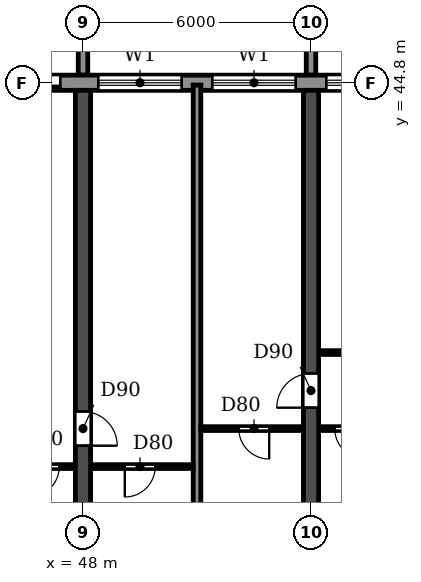
"""IFC4 building model, lengths in metres.
Left out: names, types, materials, properties, quantities, classifications, styles, units other than length and angle.
Written with IfcOpenShell. Run it as: python <this file> out.ifc"""

import sys

from ifc_helpers import new_model, si_unit, direction, frame, frame_2d, origin, place, context, subcontext, project, spatial, polyline, rectangle, outline, extrude, source, transform, mapped, element, fill, save


model = new_model("IFC4")
c1 = context("Model", 3, precision=1e-05, world=origin(), true_north=direction((0.0, 1.0)))
c2 = subcontext(c1, "Body", "Model", "MODEL_VIEW")
j1 = project(units=[si_unit("LENGTHUNIT", "METRE"), si_unit("PLANEANGLEUNIT", "RADIAN")], contexts=[c1])
p1 = place(None, origin())
s1 = spatial("IfcSite", under=j1, at=p1, CompositionType="ELEMENT")
p2 = place(p1, origin())
s2 = spatial("IfcBuilding", under=s1, at=p2, CompositionType="ELEMENT")
p3 = place(p2, frame((0.0, 0.0, 43.2)))
s3 = spatial("IfcBuildingStorey", under=s2, at=p3, CompositionType="ELEMENT", Elevation=43.2)
p4 = place(p3, frame((48.0, 30.55, 0.0), z_axis=(0.0, 0.0, 1.0), x_axis=(0.0, 1.0, 0.0)))
e1 = element("IfcWall", 1, at=p4, inside=s3, PredefinedType="SHEAR", context=c2, shape_type="SweptSolid", body=[
    extrude(rectangle(XDim=14.05, YDim=0.4, at=frame_2d((7.025, 0.0))), origin(), (0.0, 0.0, 1.0), 3.05),
])
p5 = place(p4, frame((4.7, 0.0, 0.0)))
e2 = element("IfcOpeningElement", 2, at=p5, cuts=e1, PredefinedType="OPENING", context=c2, shape_type="SweptSolid", body=[
    extrude(rectangle(XDim=0.9, YDim=2.1, at=frame_2d((0.45, 1.05))), frame((0.0, 0.21, 0.0), z_axis=(0.0, -1.0, 0.0), x_axis=(1.0, 0.0, 0.0)), (0.0, 0.0, 1.0), 0.42),
])
p6 = place(p3, frame((54.0, 30.55, 0.0), z_axis=(0.0, 0.0, 1.0), x_axis=(0.0, 1.0, 0.0)))
e3 = element("IfcWall", 3, at=p6, inside=s3, PredefinedType="SHEAR", context=c2, shape_type="SweptSolid", body=[
    extrude(rectangle(XDim=14.05, YDim=0.4, at=frame_2d((7.025, 0.0))), origin(), (0.0, 0.0, 1.0), 3.05),
])
p7 = place(p6, frame((5.7, 0.0, 0.0)))
e4 = element("IfcOpeningElement", 4, at=p7, cuts=e3, PredefinedType="OPENING", context=c2, shape_type="SweptSolid", body=[
    extrude(rectangle(XDim=0.9, YDim=2.1, at=frame_2d((0.45, 1.05))), frame((0.0, 0.21, 0.0), z_axis=(0.0, -1.0, 0.0), x_axis=(1.0, 0.0, 0.0)), (0.0, 0.0, 1.0), 0.42),
])
p8 = place(p3, frame((97.317, 44.8, 0.0), z_axis=(0.0, 0.0, 1.0), x_axis=(-1.0, 0.0, 0.0)))
e5 = element("IfcWall", 5, at=p8, inside=s3, PredefinedType="STANDARD", context=c2, shape_type="SweptSolid", body=[
    extrude(rectangle(XDim=92.634, YDim=0.4, at=frame_2d((46.317, 0.0))), origin(), (0.0, 0.0, 1.0), 3.05),
])
p9 = place(p8, frame((88.917, 0.0, 0.0)))
e6 = element("IfcOpeningElement", 6, at=p9, cuts=e5, PredefinedType="OPENING", context=c2, shape_type="SweptSolid", body=[
    extrude(rectangle(XDim=1.8, YDim=2.4, at=frame_2d((0.9, 1.2))), frame((0.0, 0.21, 0.0), z_axis=(0.0, -1.0, 0.0), x_axis=(1.0, 0.0, 0.0)), (0.0, 0.0, 1.0), 0.42),
])
p10 = place(p8, frame((85.717, 0.0, 0.9)))
e7 = element("IfcOpeningElement", 7, at=p10, cuts=e5, PredefinedType="OPENING", context=c2, shape_type="SweptSolid", body=[
    extrude(rectangle(XDim=2.2, YDim=1.5, at=frame_2d((1.1, 0.75))), frame((0.0, 0.21, 0.0), z_axis=(0.0, -1.0, 0.0), x_axis=(1.0, 0.0, 0.0)), (0.0, 0.0, 1.0), 0.42),
])
p11 = place(p8, frame((82.717, 0.0, 0.9)))
e8 = element("IfcOpeningElement", 8, at=p11, cuts=e5, PredefinedType="OPENING", context=c2, shape_type="SweptSolid", body=[
    extrude(rectangle(XDim=2.2, YDim=1.5, at=frame_2d((1.1, 0.75))), frame((0.0, 0.21, 0.0), z_axis=(0.0, -1.0, 0.0), x_axis=(1.0, 0.0, 0.0)), (0.0, 0.0, 1.0), 0.42),
])
p12 = place(p8, frame((79.717, 0.0, 0.9)))
e9 = element("IfcOpeningElement", 9, at=p12, cuts=e5, PredefinedType="OPENING", context=c2, shape_type="SweptSolid", body=[
    extrude(rectangle(XDim=2.2, YDim=1.5, at=frame_2d((1.1, 0.75))), frame((0.0, 0.21, 0.0), z_axis=(0.0, -1.0, 0.0), x_axis=(1.0, 0.0, 0.0)), (0.0, 0.0, 1.0), 0.42),
])
p13 = place(p8, frame((76.717, 0.0, 0.9)))
e10 = element("IfcOpeningElement", 10, at=p13, cuts=e5, PredefinedType="OPENING", context=c2, shape_type="SweptSolid", body=[
    extrude(rectangle(XDim=2.2, YDim=1.5, at=frame_2d((1.1, 0.75))), frame((0.0, 0.21, 0.0), z_axis=(0.0, -1.0, 0.0), x_axis=(1.0, 0.0, 0.0)), (0.0, 0.0, 1.0), 0.42),
])
p14 = place(p8, frame((73.917, 0.0, 0.0)))
e11 = element("IfcOpeningElement", 11, at=p14, cuts=e5, PredefinedType="OPENING", context=c2, shape_type="SweptSolid", body=[
    extrude(rectangle(XDim=1.8, YDim=2.4, at=frame_2d((0.9, 1.2))), frame((0.0, 0.21, 0.0), z_axis=(0.0, -1.0, 0.0), x_axis=(1.0, 0.0, 0.0)), (0.0, 0.0, 1.0), 0.42),
])
p15 = place(p8, frame((70.717, 0.0, 0.9)))
e12 = element("IfcOpeningElement", 12, at=p15, cuts=e5, PredefinedType="OPENING", context=c2, shape_type="SweptSolid", body=[
    extrude(rectangle(XDim=2.2, YDim=1.5, at=frame_2d((1.1, 0.75))), frame((0.0, 0.21, 0.0), z_axis=(0.0, -1.0, 0.0), x_axis=(1.0, 0.0, 0.0)), (0.0, 0.0, 1.0), 0.42),
])
p16 = place(p8, frame((67.717, 0.0, 0.9)))
e13 = element("IfcOpeningElement", 13, at=p16, cuts=e5, PredefinedType="OPENING", context=c2, shape_type="SweptSolid", body=[
    extrude(rectangle(XDim=2.2, YDim=1.5, at=frame_2d((1.1, 0.75))), frame((0.0, 0.21, 0.0), z_axis=(0.0, -1.0, 0.0), x_axis=(1.0, 0.0, 0.0)), (0.0, 0.0, 1.0), 0.42),
])
p17 = place(p8, frame((64.717, 0.0, 0.9)))
e14 = element("IfcOpeningElement", 14, at=p17, cuts=e5, PredefinedType="OPENING", context=c2, shape_type="SweptSolid", body=[
    extrude(rectangle(XDim=2.2, YDim=1.5, at=frame_2d((1.1, 0.75))), frame((0.0, 0.21, 0.0), z_axis=(0.0, -1.0, 0.0), x_axis=(1.0, 0.0, 0.0)), (0.0, 0.0, 1.0), 0.42),
])
p18 = place(p8, frame((61.917, 0.0, 0.0)))
e15 = element("IfcOpeningElement", 15, at=p18, cuts=e5, PredefinedType="OPENING", context=c2, shape_type="SweptSolid", body=[
    extrude(rectangle(XDim=1.8, YDim=2.4, at=frame_2d((0.9, 1.2))), frame((0.0, 0.21, 0.0), z_axis=(0.0, -1.0, 0.0), x_axis=(1.0, 0.0, 0.0)), (0.0, 0.0, 1.0), 0.42),
])
p19 = place(p8, frame((58.717, 0.0, 0.9)))
e16 = element("IfcOpeningElement", 16, at=p19, cuts=e5, PredefinedType="OPENING", context=c2, shape_type="SweptSolid", body=[
    extrude(rectangle(XDim=2.2, YDim=1.5, at=frame_2d((1.1, 0.75))), frame((0.0, 0.21, 0.0), z_axis=(0.0, -1.0, 0.0), x_axis=(1.0, 0.0, 0.0)), (0.0, 0.0, 1.0), 0.42),
])
p20 = place(p8, frame((55.717, 0.0, 0.9)))
e17 = element("IfcOpeningElement", 17, at=p20, cuts=e5, PredefinedType="OPENING", context=c2, shape_type="SweptSolid", body=[
    extrude(rectangle(XDim=2.2, YDim=1.5, at=frame_2d((1.1, 0.75))), frame((0.0, 0.21, 0.0), z_axis=(0.0, -1.0, 0.0), x_axis=(1.0, 0.0, 0.0)), (0.0, 0.0, 1.0), 0.42),
])
p21 = place(p8, frame((52.717, 0.0, 0.9)))
e18 = element("IfcOpeningElement", 18, at=p21, cuts=e5, PredefinedType="OPENING", context=c2, shape_type="SweptSolid", body=[
    extrude(rectangle(XDim=2.2, YDim=1.5, at=frame_2d((1.1, 0.75))), frame((0.0, 0.21, 0.0), z_axis=(0.0, -1.0, 0.0), x_axis=(1.0, 0.0, 0.0)), (0.0, 0.0, 1.0), 0.42),
])
p22 = place(p8, frame((49.917, 0.0, 0.0)))
e19 = element("IfcOpeningElement", 19, at=p22, cuts=e5, PredefinedType="OPENING", context=c2, shape_type="SweptSolid", body=[
    extrude(rectangle(XDim=1.8, YDim=2.4, at=frame_2d((0.9, 1.2))), frame((0.0, 0.21, 0.0), z_axis=(0.0, -1.0, 0.0), x_axis=(1.0, 0.0, 0.0)), (0.0, 0.0, 1.0), 0.42),
])
p23 = place(p8, frame((46.717, 0.0, 0.9)))
e20 = element("IfcOpeningElement", 20, at=p23, cuts=e5, PredefinedType="OPENING", context=c2, shape_type="SweptSolid", body=[
    extrude(rectangle(XDim=2.2, YDim=1.5, at=frame_2d((1.1, 0.75))), frame((0.0, 0.21, 0.0), z_axis=(0.0, -1.0, 0.0), x_axis=(1.0, 0.0, 0.0)), (0.0, 0.0, 1.0), 0.42),
])
p24 = place(p8, frame((43.717, 0.0, 0.9)))
e21 = element("IfcOpeningElement", 21, at=p24, cuts=e5, PredefinedType="OPENING", context=c2, shape_type="SweptSolid", body=[
    extrude(rectangle(XDim=2.2, YDim=1.5, at=frame_2d((1.1, 0.75))), frame((0.0, 0.21, 0.0), z_axis=(0.0, -1.0, 0.0), x_axis=(1.0, 0.0, 0.0)), (0.0, 0.0, 1.0), 0.42),
])
p25 = place(p8, frame((40.717, 0.0, 0.9)))
e22 = element("IfcOpeningElement", 22, at=p25, cuts=e5, PredefinedType="OPENING", context=c2, shape_type="SweptSolid", body=[
    extrude(rectangle(XDim=2.2, YDim=1.5, at=frame_2d((1.1, 0.75))), frame((0.0, 0.21, 0.0), z_axis=(0.0, -1.0, 0.0), x_axis=(1.0, 0.0, 0.0)), (0.0, 0.0, 1.0), 0.42),
])
p26 = place(p8, frame((37.917, 0.0, 0.0)))
e23 = element("IfcOpeningElement", 23, at=p26, cuts=e5, PredefinedType="OPENING", context=c2, shape_type="SweptSolid", body=[
    extrude(rectangle(XDim=1.8, YDim=2.4, at=frame_2d((0.9, 1.2))), frame((0.0, 0.21, 0.0), z_axis=(0.0, -1.0, 0.0), x_axis=(1.0, 0.0, 0.0)), (0.0, 0.0, 1.0), 0.42),
])
p27 = place(p8, frame((34.717, 0.0, 0.9)))
e24 = element("IfcOpeningElement", 24, at=p27, cuts=e5, PredefinedType="OPENING", context=c2, shape_type="SweptSolid", body=[
    extrude(rectangle(XDim=2.2, YDim=1.5, at=frame_2d((1.1, 0.75))), frame((0.0, 0.21, 0.0), z_axis=(0.0, -1.0, 0.0), x_axis=(1.0, 0.0, 0.0)), (0.0, 0.0, 1.0), 0.42),
])
p28 = place(p8, frame((31.717, 0.0, 0.9)))
e25 = element("IfcOpeningElement", 25, at=p28, cuts=e5, PredefinedType="OPENING", context=c2, shape_type="SweptSolid", body=[
    extrude(rectangle(XDim=2.2, YDim=1.5, at=frame_2d((1.1, 0.75))), frame((0.0, 0.21, 0.0), z_axis=(0.0, -1.0, 0.0), x_axis=(1.0, 0.0, 0.0)), (0.0, 0.0, 1.0), 0.42),
])
p29 = place(p8, frame((28.717, 0.0, 0.9)))
e26 = element("IfcOpeningElement", 26, at=p29, cuts=e5, PredefinedType="OPENING", context=c2, shape_type="SweptSolid", body=[
    extrude(rectangle(XDim=2.2, YDim=1.5, at=frame_2d((1.1, 0.75))), frame((0.0, 0.21, 0.0), z_axis=(0.0, -1.0, 0.0), x_axis=(1.0, 0.0, 0.0)), (0.0, 0.0, 1.0), 0.42),
])
p30 = place(p8, frame((25.917, 0.0, 0.0)))
e27 = element("IfcOpeningElement", 27, at=p30, cuts=e5, PredefinedType="OPENING", context=c2, shape_type="SweptSolid", body=[
    extrude(rectangle(XDim=1.8, YDim=2.4, at=frame_2d((0.9, 1.2))), frame((0.0, 0.21, 0.0), z_axis=(0.0, -1.0, 0.0), x_axis=(1.0, 0.0, 0.0)), (0.0, 0.0, 1.0), 0.42),
])
p31 = place(p8, frame((22.917, 0.0, 0.0)))
e28 = element("IfcOpeningElement", 28, at=p31, cuts=e5, PredefinedType="OPENING", context=c2, shape_type="SweptSolid", body=[
    extrude(rectangle(XDim=1.8, YDim=2.4, at=frame_2d((0.9, 1.2))), frame((0.0, 0.21, 0.0), z_axis=(0.0, -1.0, 0.0), x_axis=(1.0, 0.0, 0.0)), (0.0, 0.0, 1.0), 0.42),
])
p32 = place(p8, frame((19.717, 0.0, 0.9)))
e29 = element("IfcOpeningElement", 29, at=p32, cuts=e5, PredefinedType="OPENING", context=c2, shape_type="SweptSolid", body=[
    extrude(rectangle(XDim=2.2, YDim=1.5, at=frame_2d((1.1, 0.75))), frame((0.0, 0.21, 0.0), z_axis=(0.0, -1.0, 0.0), x_axis=(1.0, 0.0, 0.0)), (0.0, 0.0, 1.0), 0.42),
])
p33 = place(p8, frame((16.717, 0.0, 0.9)))
e30 = element("IfcOpeningElement", 30, at=p33, cuts=e5, PredefinedType="OPENING", context=c2, shape_type="SweptSolid", body=[
    extrude(rectangle(XDim=2.2, YDim=1.5, at=frame_2d((1.1, 0.75))), frame((0.0, 0.21, 0.0), z_axis=(0.0, -1.0, 0.0), x_axis=(1.0, 0.0, 0.0)), (0.0, 0.0, 1.0), 0.42),
])
p34 = place(p8, frame((13.717, 0.0, 0.9)))
e31 = element("IfcOpeningElement", 31, at=p34, cuts=e5, PredefinedType="OPENING", context=c2, shape_type="SweptSolid", body=[
    extrude(rectangle(XDim=2.2, YDim=1.5, at=frame_2d((1.1, 0.75))), frame((0.0, 0.21, 0.0), z_axis=(0.0, -1.0, 0.0), x_axis=(1.0, 0.0, 0.0)), (0.0, 0.0, 1.0), 0.42),
])
p35 = place(p8, frame((10.717, 0.0, 0.9)))
e32 = element("IfcOpeningElement", 32, at=p35, cuts=e5, PredefinedType="OPENING", context=c2, shape_type="SweptSolid", body=[
    extrude(rectangle(XDim=2.2, YDim=1.5, at=frame_2d((1.1, 0.75))), frame((0.0, 0.21, 0.0), z_axis=(0.0, -1.0, 0.0), x_axis=(1.0, 0.0, 0.0)), (0.0, 0.0, 1.0), 0.42),
])
p36 = place(p8, frame((7.917, 0.0, 0.0)))
e33 = element("IfcOpeningElement", 33, at=p36, cuts=e5, PredefinedType="OPENING", context=c2, shape_type="SweptSolid", body=[
    extrude(rectangle(XDim=1.8, YDim=2.4, at=frame_2d((0.9, 1.2))), frame((0.0, 0.21, 0.0), z_axis=(0.0, -1.0, 0.0), x_axis=(1.0, 0.0, 0.0)), (0.0, 0.0, 1.0), 0.42),
])
p37 = place(p8, frame((4.717, 0.0, 0.9)))
e34 = element("IfcOpeningElement", 34, at=p37, cuts=e5, PredefinedType="OPENING", context=c2, shape_type="SweptSolid", body=[
    extrude(rectangle(XDim=2.2, YDim=1.5, at=frame_2d((1.1, 0.75))), frame((0.0, 0.21, 0.0), z_axis=(0.0, -1.0, 0.0), x_axis=(1.0, 0.0, 0.0)), (0.0, 0.0, 1.0), 0.42),
])
p38 = place(p8, frame((1.917, 0.0, 0.0)))
e35 = element("IfcOpeningElement", 35, at=p38, cuts=e5, PredefinedType="OPENING", context=c2, shape_type="SweptSolid", body=[
    extrude(rectangle(XDim=1.8, YDim=2.4, at=frame_2d((0.9, 1.2))), frame((0.0, 0.21, 0.0), z_axis=(0.0, -1.0, 0.0), x_axis=(1.0, 0.0, 0.0)), (0.0, 0.0, 1.0), 0.42),
])
m1 = source(origin(), c2, "Body", "SweptSolid", [
    extrude(outline(polyline([(0.0, 0.0), (0.25, 0.0), (0.25, 3.1), (0.0, 3.1), (0.0, 0.0)])), origin(), (0.0, 0.0, 1.0), 3.1),
])
for number, where in (
    (36, (47.875, 45.0, 0.0)),
    (37, (53.875, 45.0, 0.0)),
):
    element("IfcWall", number, at=place(p3, frame(where)), inside=s3, PredefinedType="STANDARD", context=c2, shape_type="MappedRepresentation", body=[
        mapped(m1, transform((0.0, 0.0, 0.0))),
    ])
p39 = place(p3, frame((51.0, 30.56, 0.0), z_axis=(0.0, 0.0, 1.0), x_axis=(0.0, 1.0, 0.0)))
e38 = element("IfcWall", 38, at=p39, inside=s3, PredefinedType="PARTITIONING", context=c2, shape_type="SweptSolid", body=[
    extrude(rectangle(XDim=14.18, YDim=0.2, at=frame_2d((7.09, 0.0))), origin(), (0.0, 0.0, 1.0), 3.05),
])
p40 = place(p3, frame((45.9, 34.7, 0.0), z_axis=(0.0, 0.0, 1.0), x_axis=(1.0, 0.0, 0.0)))
e39 = element("IfcWall", 39, at=p40, inside=s3, PredefinedType="PARTITIONING", context=c2, shape_type="SweptSolid", body=[
    extrude(rectangle(XDim=1.89, YDim=0.1, at=frame_2d((0.945, 0.0))), origin(), (0.0, 0.0, 1.0), 3.05),
])
p41 = place(p40, frame((0.675, 0.0, 0.0)))
e40 = element("IfcOpeningElement", 40, at=p41, cuts=e39, PredefinedType="OPENING", context=c2, shape_type="SweptSolid", body=[
    extrude(rectangle(XDim=0.8, YDim=2.1, at=frame_2d((0.4, 1.05))), frame((0.0, 0.06, 0.0), z_axis=(0.0, -1.0, 0.0), x_axis=(1.0, 0.0, 0.0)), (0.0, 0.0, 1.0), 0.12),
])
p42 = place(p3, frame((48.21, 34.7, 0.0), z_axis=(0.0, 0.0, 1.0), x_axis=(1.0, 0.0, 0.0)))
e41 = element("IfcWall", 41, at=p42, inside=s3, PredefinedType="PARTITIONING", context=c2, shape_type="SweptSolid", body=[
    extrude(rectangle(XDim=2.69, YDim=0.1, at=frame_2d((1.345, 0.0))), origin(), (0.0, 0.0, 1.0), 3.05),
])
p43 = place(p42, frame((0.89, 0.0, 0.0)))
e42 = element("IfcOpeningElement", 42, at=p43, cuts=e41, PredefinedType="OPENING", context=c2, shape_type="SweptSolid", body=[
    extrude(rectangle(XDim=0.8, YDim=2.1, at=frame_2d((0.4, 1.05))), frame((0.0, 0.06, 0.0), z_axis=(0.0, -1.0, 0.0), x_axis=(1.0, 0.0, 0.0)), (0.0, 0.0, 1.0), 0.12),
])
p44 = place(p3, frame((51.1, 35.7, 0.0), z_axis=(0.0, 0.0, 1.0), x_axis=(1.0, 0.0, 0.0)))
e43 = element("IfcWall", 43, at=p44, inside=s3, PredefinedType="PARTITIONING", context=c2, shape_type="SweptSolid", body=[
    extrude(rectangle(XDim=2.69, YDim=0.1, at=frame_2d((1.345, 0.0))), origin(), (0.0, 0.0, 1.0), 3.05),
])
p45 = place(p44, frame((1.0, 0.0, 0.0)))
e44 = element("IfcOpeningElement", 44, at=p45, cuts=e43, PredefinedType="OPENING", context=c2, shape_type="SweptSolid", body=[
    extrude(rectangle(XDim=0.8, YDim=2.1, at=frame_2d((0.4, 1.05))), frame((0.0, 0.06, 0.0), z_axis=(0.0, -1.0, 0.0), x_axis=(1.0, 0.0, 0.0)), (0.0, 0.0, 1.0), 0.12),
])
p46 = place(p3, frame((54.21, 35.7, 0.0), z_axis=(0.0, 0.0, 1.0), x_axis=(1.0, 0.0, 0.0)))
e45 = element("IfcWall", 45, at=p46, inside=s3, PredefinedType="PARTITIONING", context=c2, shape_type="SweptSolid", body=[
    extrude(rectangle(XDim=1.89, YDim=0.1, at=frame_2d((0.945, 0.0))), origin(), (0.0, 0.0, 1.0), 3.05),
])
p47 = place(p46, frame((0.415, 0.0, 0.0)))
e46 = element("IfcOpeningElement", 46, at=p47, cuts=e45, PredefinedType="OPENING", context=c2, shape_type="SweptSolid", body=[
    extrude(rectangle(XDim=0.8, YDim=2.1, at=frame_2d((0.4, 1.05))), frame((0.0, 0.06, 0.0), z_axis=(0.0, -1.0, 0.0), x_axis=(1.0, 0.0, 0.0)), (0.0, 0.0, 1.0), 0.12),
])
p48 = place(p3, frame((54.21, 37.7, 0.0), z_axis=(0.0, 0.0, 1.0), x_axis=(1.0, 0.0, 0.0)))
e47 = element("IfcWall", 47, at=p48, inside=s3, PredefinedType="PARTITIONING", context=c2, shape_type="SweptSolid", body=[
    extrude(rectangle(XDim=2.84, YDim=0.1, at=frame_2d((1.42, 0.0))), origin(), (0.0, 0.0, 1.0), 3.05),
])
p49 = place(p48, frame((1.39, 0.0, 0.0)))
e48 = element("IfcOpeningElement", 48, at=p49, cuts=e47, PredefinedType="OPENING", context=c2, shape_type="SweptSolid", body=[
    extrude(rectangle(XDim=0.9, YDim=2.1, at=frame_2d((0.45, 1.05))), frame((0.0, 0.06, 0.0), z_axis=(0.0, -1.0, 0.0), x_axis=(1.0, 0.0, 0.0)), (0.0, 0.0, 1.0), 0.12),
])
p50 = place(p22, origin())
e49 = element("IfcDoor", 49, at=p50, inside=s3, OperationType="DOUBLE_DOOR_SLIDING", PredefinedType="DOOR", context=c2, shape_type="SweptSolid", body=[
    extrude(rectangle(XDim=1.8, YDim=2.4, at=frame_2d((0.9, 1.2))), frame((0.0, 0.025, 0.0), z_axis=(0.0, -1.0, 0.0), x_axis=(1.0, 0.0, 0.0)), (0.0, 0.0, 1.0), 0.05),
])
fill(e19, e49)
p51 = place(p23, origin())
e50 = element("IfcWindow", 50, at=p51, inside=s3, PartitioningType="DOUBLE_PANEL_HORIZONTAL", PredefinedType="WINDOW", context=c2, shape_type="SweptSolid", body=[
    extrude(rectangle(XDim=2.2, YDim=1.5, at=frame_2d((1.1, 0.75))), frame((0.0, 0.03, 0.0), z_axis=(0.0, -1.0, 0.0), x_axis=(1.0, 0.0, 0.0)), (0.0, 0.0, 1.0), 0.06),
])
fill(e20, e50)
p52 = place(p24, origin())
e51 = element("IfcWindow", 51, at=p52, inside=s3, PartitioningType="DOUBLE_PANEL_HORIZONTAL", PredefinedType="WINDOW", context=c2, shape_type="SweptSolid", body=[
    extrude(rectangle(XDim=2.2, YDim=1.5, at=frame_2d((1.1, 0.75))), frame((0.0, 0.03, 0.0), z_axis=(0.0, -1.0, 0.0), x_axis=(1.0, 0.0, 0.0)), (0.0, 0.0, 1.0), 0.06),
])
fill(e21, e51)
p53 = place(p25, origin())
e52 = element("IfcWindow", 52, at=p53, inside=s3, PartitioningType="DOUBLE_PANEL_HORIZONTAL", PredefinedType="WINDOW", context=c2, shape_type="SweptSolid", body=[
    extrude(rectangle(XDim=2.2, YDim=1.5, at=frame_2d((1.1, 0.75))), frame((0.0, 0.03, 0.0), z_axis=(0.0, -1.0, 0.0), x_axis=(1.0, 0.0, 0.0)), (0.0, 0.0, 1.0), 0.06),
])
fill(e22, e52)
p54 = place(p43, frame((0.8, 0.0, 0.0), z_axis=(0.0, 0.0, 1.0), x_axis=(-1.0, 0.0, 0.0)))
e53 = element("IfcDoor", 53, at=p54, inside=s3, OperationType="SINGLE_SWING_RIGHT", PredefinedType="DOOR", context=c2, shape_type="SweptSolid", body=[
    extrude(rectangle(XDim=0.8, YDim=2.1, at=frame_2d((0.4, 1.05))), frame((0.0, 0.025, 0.0), z_axis=(0.0, -1.0, 0.0), x_axis=(1.0, 0.0, 0.0)), (0.0, 0.0, 1.0), 0.05),
])
fill(e42, e53)
p55 = place(p41, frame((0.8, 0.0, 0.0), z_axis=(0.0, 0.0, 1.0), x_axis=(-1.0, 0.0, 0.0)))
e54 = element("IfcDoor", 54, at=p55, inside=s3, OperationType="SINGLE_SWING_RIGHT", PredefinedType="DOOR", context=c2, shape_type="SweptSolid", body=[
    extrude(rectangle(XDim=0.8, YDim=2.1, at=frame_2d((0.4, 1.05))), frame((0.0, 0.025, 0.0), z_axis=(0.0, -1.0, 0.0), x_axis=(1.0, 0.0, 0.0)), (0.0, 0.0, 1.0), 0.05),
])
fill(e40, e54)
p56 = place(p5, frame((0.9, 0.0, 0.0), z_axis=(0.0, 0.0, 1.0), x_axis=(-1.0, 0.0, 0.0)))
e55 = element("IfcDoor", 55, at=p56, inside=s3, OperationType="SINGLE_SWING_RIGHT", PredefinedType="DOOR", context=c2, shape_type="SweptSolid", body=[
    extrude(rectangle(XDim=0.9, YDim=2.1, at=frame_2d((0.45, 1.05))), frame((0.0, 0.025, 0.0), z_axis=(0.0, -1.0, 0.0), x_axis=(1.0, 0.0, 0.0)), (0.0, 0.0, 1.0), 0.05),
])
fill(e2, e55)
p57 = place(p45, frame((0.8, 0.0, 0.0), z_axis=(0.0, 0.0, 1.0), x_axis=(-1.0, 0.0, 0.0)))
e56 = element("IfcDoor", 56, at=p57, inside=s3, OperationType="SINGLE_SWING_LEFT", PredefinedType="DOOR", context=c2, shape_type="SweptSolid", body=[
    extrude(rectangle(XDim=0.8, YDim=2.1, at=frame_2d((0.4, 1.05))), frame((0.0, 0.025, 0.0), z_axis=(0.0, -1.0, 0.0), x_axis=(1.0, 0.0, 0.0)), (0.0, 0.0, 1.0), 0.05),
])
fill(e44, e56)
p58 = place(p7, origin())
e57 = element("IfcDoor", 57, at=p58, inside=s3, OperationType="SINGLE_SWING_LEFT", PredefinedType="DOOR", context=c2, shape_type="SweptSolid", body=[
    extrude(rectangle(XDim=0.9, YDim=2.1, at=frame_2d((0.45, 1.05))), frame((0.0, 0.025, 0.0), z_axis=(0.0, -1.0, 0.0), x_axis=(1.0, 0.0, 0.0)), (0.0, 0.0, 1.0), 0.05),
])
fill(e4, e57)
p59 = place(p47, frame((0.8, 0.0, 0.0), z_axis=(0.0, 0.0, 1.0), x_axis=(-1.0, 0.0, 0.0)))
e58 = element("IfcDoor", 58, at=p59, inside=s3, OperationType="SINGLE_SWING_LEFT", PredefinedType="DOOR", context=c2, shape_type="SweptSolid", body=[
    extrude(rectangle(XDim=0.8, YDim=2.1, at=frame_2d((0.4, 1.05))), frame((0.0, 0.025, 0.0), z_axis=(0.0, -1.0, 0.0), x_axis=(1.0, 0.0, 0.0)), (0.0, 0.0, 1.0), 0.05),
])
fill(e46, e58)
save(model, sys.argv[1])
